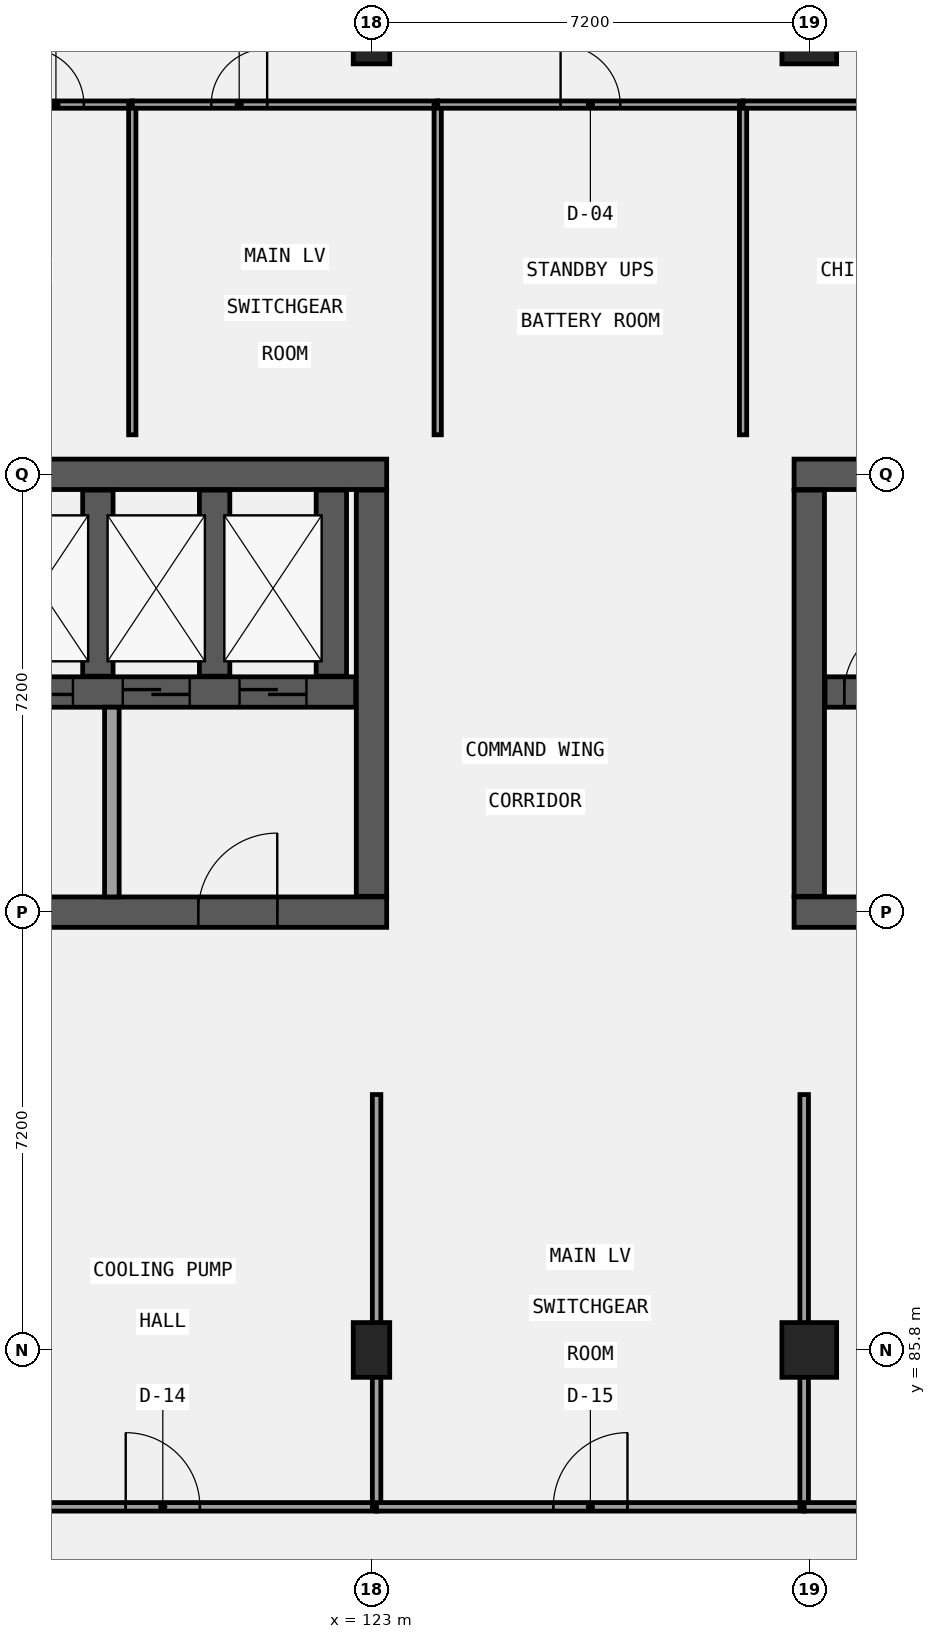
"""IFC4 building model, lengths in metres.
Left out: names, types, materials, properties, quantities, classifications, styles, units other than length and angle.
Written with IfcOpenShell. Run it as: python <this file> out.ifc"""

import sys

from ifc_helpers import new_model, si_unit, direction, frame, frame_2d, origin, origin_2d, place, context, subcontext, project, spatial, rectangle, extrude, element, fill, save


model = new_model("IFC4")
c1 = context("Model", 3, precision=1e-05, world=origin(), true_north=direction((0.0, 1.0)))
c2 = subcontext(c1, "Body", "Model", "MODEL_VIEW")
j1 = project(units=[si_unit("LENGTHUNIT", "METRE"), si_unit("PLANEANGLEUNIT", "RADIAN")], contexts=[c1])
p1 = place(None, origin())
s1 = spatial("IfcSite", under=j1, at=p1, CompositionType="ELEMENT")
p2 = place(p1, origin())
s2 = spatial("IfcBuilding", under=s1, at=p2, CompositionType="ELEMENT")
p3 = place(p2, frame((0.0, 0.0, -8.4)))
s3 = spatial("IfcBuildingStorey", under=s2, at=p3, CompositionType="ELEMENT", Elevation=-8.4)
p4 = place(p3, frame((108.35, 100.2, 0.0), z_axis=(0.0, 0.0, 1.0), x_axis=(1.0, 0.0, 0.0)))
e1 = element("IfcWall", 1, at=p4, inside=s3, PredefinedType="SHEAR", context=c2, shape_type="SweptSolid", body=[
    extrude(rectangle(XDim=14.9, YDim=0.5, at=frame_2d((7.45, 0.0))), origin(), (0.0, 0.0, 1.0), 4.2),
])
p5 = place(p3, frame((108.35, 93.0, 0.0), z_axis=(0.0, 0.0, 1.0), x_axis=(1.0, 0.0, 0.0)))
e2 = element("IfcWall", 2, at=p5, inside=s3, PredefinedType="SHEAR", context=c2, shape_type="SweptSolid", body=[
    extrude(rectangle(XDim=14.9, YDim=0.5, at=frame_2d((7.45, 0.0))), origin(), (0.0, 0.0, 1.0), 4.2),
])
p6 = place(p5, frame((3.8, 0.0, 0.0)))
e3 = element("IfcOpeningElement", 3, at=p6, cuts=e2, PredefinedType="OPENING", context=c2, shape_type="SweptSolid", body=[
    extrude(rectangle(XDim=1.3, YDim=2.2, at=frame_2d((0.65, 1.1))), frame((0.0, 0.26, 0.0), z_axis=(0.0, -1.0, 0.0), x_axis=(1.0, 0.0, 0.0)), (0.0, 0.0, 1.0), 0.52),
])
p7 = place(p5, frame((11.8, 0.0, 0.0)))
e4 = element("IfcOpeningElement", 4, at=p7, cuts=e2, PredefinedType="OPENING", context=c2, shape_type="SweptSolid", body=[
    extrude(rectangle(XDim=1.3, YDim=2.2, at=frame_2d((0.65, 1.1))), frame((0.0, 0.26, 0.0), z_axis=(0.0, -1.0, 0.0), x_axis=(1.0, 0.0, 0.0)), (0.0, 0.0, 1.0), 0.52),
])
p8 = place(p3, frame((123.0, 93.26, 0.0), z_axis=(0.0, 0.0, 1.0), x_axis=(0.0, 1.0, 0.0)))
e5 = element("IfcWall", 5, at=p8, inside=s3, PredefinedType="SHEAR", context=c2, shape_type="SweptSolid", body=[
    extrude(rectangle(XDim=6.68, YDim=0.5, at=frame_2d((3.34, 0.0))), origin(), (0.0, 0.0, 1.0), 4.2),
])
p9 = place(p3, frame((108.86, 96.62, 0.0), z_axis=(0.0, 0.0, 1.0), x_axis=(1.0, 0.0, 0.0)))
e6 = element("IfcWall", 6, at=p9, inside=s3, PredefinedType="SHEAR", context=c2, shape_type="SweptSolid", body=[
    extrude(rectangle(XDim=13.88, YDim=0.5, at=frame_2d((6.94, 0.0))), origin(), (0.0, 0.0, 1.0), 4.2),
])
p10 = place(p9, frame((8.13, 0.0, 0.0)))
e7 = element("IfcOpeningElement", 7, at=p10, cuts=e6, PredefinedType="OPENING", context=c2, shape_type="SweptSolid", body=[
    extrude(rectangle(XDim=1.1, YDim=2.15, at=frame_2d((0.55, 1.075))), frame((0.0, 0.26, 0.0), z_axis=(0.0, -1.0, 0.0), x_axis=(1.0, 0.0, 0.0)), (0.0, 0.0, 1.0), 0.52),
])
p11 = place(p9, frame((10.05, 0.0, 0.0)))
e8 = element("IfcOpeningElement", 8, at=p11, cuts=e6, PredefinedType="OPENING", context=c2, shape_type="SweptSolid", body=[
    extrude(rectangle(XDim=1.1, YDim=2.15, at=frame_2d((0.55, 1.075))), frame((0.0, 0.26, 0.0), z_axis=(0.0, -1.0, 0.0), x_axis=(1.0, 0.0, 0.0)), (0.0, 0.0, 1.0), 0.52),
])
p12 = place(p9, frame((11.97, 0.0, 0.0)))
e9 = element("IfcOpeningElement", 9, at=p12, cuts=e6, PredefinedType="OPENING", context=c2, shape_type="SweptSolid", body=[
    extrude(rectangle(XDim=1.1, YDim=2.15, at=frame_2d((0.55, 1.075))), frame((0.0, 0.26, 0.0), z_axis=(0.0, -1.0, 0.0), x_axis=(1.0, 0.0, 0.0)), (0.0, 0.0, 1.0), 0.52),
])
p13 = place(p9, frame((0.315, 0.0, 0.0)))
e10 = element("IfcOpeningElement", 10, at=p13, cuts=e6, PredefinedType="OPENING", context=c2, shape_type="SweptSolid", body=[
    extrude(rectangle(XDim=1.15, YDim=2.15, at=frame_2d((0.575, 1.075))), frame((0.0, 0.26, 0.0), z_axis=(0.0, -1.0, 0.0), x_axis=(1.0, 0.0, 0.0)), (0.0, 0.0, 1.0), 0.52),
])
for number, where, z_axis, x_axis in (
    (11, (118.5, 96.88, 0.0), (0.0, 0.0, 1.0), (0.0, 1.0, 0.0)),
    (12, (120.42, 96.88, 0.0), (0.0, 0.0, 1.0), (0.0, 1.0, 0.0)),
    (13, (122.34, 96.88, 0.0), (0.0, 0.0, 1.0), (0.0, 1.0, 0.0)),
):
    element("IfcWall", number, at=place(p3, frame(where, z_axis=z_axis, x_axis=x_axis)), inside=s3, PredefinedType="SHEAR", context=c2, shape_type="SweptSolid", body=[
        extrude(rectangle(XDim=3.06, YDim=0.5, at=frame_2d((1.53, 0.0))), origin(), (0.0, 0.0, 1.0), 4.2),
    ])
p14 = place(p3, frame((129.95, 100.2, 0.0), z_axis=(0.0, 0.0, 1.0), x_axis=(1.0, 0.0, 0.0)))
e14 = element("IfcWall", 14, at=p14, inside=s3, PredefinedType="SHEAR", context=c2, shape_type="SweptSolid", body=[
    extrude(rectangle(XDim=14.9, YDim=0.5, at=frame_2d((7.45, 0.0))), origin(), (0.0, 0.0, 1.0), 4.2),
])
p15 = place(p3, frame((129.95, 93.0, 0.0), z_axis=(0.0, 0.0, 1.0), x_axis=(1.0, 0.0, 0.0)))
e15 = element("IfcWall", 15, at=p15, inside=s3, PredefinedType="SHEAR", context=c2, shape_type="SweptSolid", body=[
    extrude(rectangle(XDim=14.9, YDim=0.5, at=frame_2d((7.45, 0.0))), origin(), (0.0, 0.0, 1.0), 4.2),
])
p16 = place(p15, frame((3.8, 0.0, 0.0)))
e16 = element("IfcOpeningElement", 16, at=p16, cuts=e15, PredefinedType="OPENING", context=c2, shape_type="SweptSolid", body=[
    extrude(rectangle(XDim=1.3, YDim=2.2, at=frame_2d((0.65, 1.1))), frame((0.0, 0.26, 0.0), z_axis=(0.0, -1.0, 0.0), x_axis=(1.0, 0.0, 0.0)), (0.0, 0.0, 1.0), 0.52),
])
p17 = place(p15, frame((11.8, 0.0, 0.0)))
e17 = element("IfcOpeningElement", 17, at=p17, cuts=e15, PredefinedType="OPENING", context=c2, shape_type="SweptSolid", body=[
    extrude(rectangle(XDim=1.3, YDim=2.2, at=frame_2d((0.65, 1.1))), frame((0.0, 0.26, 0.0), z_axis=(0.0, -1.0, 0.0), x_axis=(1.0, 0.0, 0.0)), (0.0, 0.0, 1.0), 0.52),
])
p18 = place(p3, frame((130.2, 93.26, 0.0), z_axis=(0.0, 0.0, 1.0), x_axis=(0.0, 1.0, 0.0)))
e18 = element("IfcWall", 18, at=p18, inside=s3, PredefinedType="SHEAR", context=c2, shape_type="SweptSolid", body=[
    extrude(rectangle(XDim=6.68, YDim=0.5, at=frame_2d((3.34, 0.0))), origin(), (0.0, 0.0, 1.0), 4.2),
])
p19 = place(p3, frame((130.46, 96.62, 0.0), z_axis=(0.0, 0.0, 1.0), x_axis=(1.0, 0.0, 0.0)))
e19 = element("IfcWall", 19, at=p19, inside=s3, PredefinedType="SHEAR", context=c2, shape_type="SweptSolid", body=[
    extrude(rectangle(XDim=13.88, YDim=0.5, at=frame_2d((6.94, 0.0))), origin(), (0.0, 0.0, 1.0), 4.2),
])
p20 = place(p19, frame((8.13, 0.0, 0.0)))
e20 = element("IfcOpeningElement", 20, at=p20, cuts=e19, PredefinedType="OPENING", context=c2, shape_type="SweptSolid", body=[
    extrude(rectangle(XDim=1.1, YDim=2.15, at=frame_2d((0.55, 1.075))), frame((0.0, 0.26, 0.0), z_axis=(0.0, -1.0, 0.0), x_axis=(1.0, 0.0, 0.0)), (0.0, 0.0, 1.0), 0.52),
])
p21 = place(p19, frame((10.05, 0.0, 0.0)))
e21 = element("IfcOpeningElement", 21, at=p21, cuts=e19, PredefinedType="OPENING", context=c2, shape_type="SweptSolid", body=[
    extrude(rectangle(XDim=1.1, YDim=2.15, at=frame_2d((0.55, 1.075))), frame((0.0, 0.26, 0.0), z_axis=(0.0, -1.0, 0.0), x_axis=(1.0, 0.0, 0.0)), (0.0, 0.0, 1.0), 0.52),
])
p22 = place(p19, frame((11.97, 0.0, 0.0)))
e22 = element("IfcOpeningElement", 22, at=p22, cuts=e19, PredefinedType="OPENING", context=c2, shape_type="SweptSolid", body=[
    extrude(rectangle(XDim=1.1, YDim=2.15, at=frame_2d((0.55, 1.075))), frame((0.0, 0.26, 0.0), z_axis=(0.0, -1.0, 0.0), x_axis=(1.0, 0.0, 0.0)), (0.0, 0.0, 1.0), 0.52),
])
p23 = place(p19, frame((0.315, 0.0, 0.0)))
e23 = element("IfcOpeningElement", 23, at=p23, cuts=e19, PredefinedType="OPENING", context=c2, shape_type="SweptSolid", body=[
    extrude(rectangle(XDim=1.15, YDim=2.15, at=frame_2d((0.575, 1.075))), frame((0.0, 0.26, 0.0), z_axis=(0.0, -1.0, 0.0), x_axis=(1.0, 0.0, 0.0)), (0.0, 0.0, 1.0), 0.52),
])
for number, where, z_axis, x_axis in (
    (24, (123.0, 85.8, 0.0), (0.0, 0.0, 1.0), (1.0, 0.0, 0.0)),
    (25, (123.0, 107.4, 0.0), (0.0, 0.0, 1.0), (1.0, 0.0, 0.0)),
):
    element("IfcColumn", number, at=place(p3, frame(where, z_axis=z_axis, x_axis=x_axis)), inside=s3, PredefinedType="COLUMN", context=c2, shape_type="SweptSolid", body=[
        extrude(rectangle(XDim=0.6, YDim=0.9, at=origin_2d()), origin(), (0.0, 0.0, 1.0), 4.2),
    ])
for number, where, z_axis, x_axis in (
    (26, (130.2, 85.8, 0.0), (0.0, 0.0, 1.0), (1.0, 0.0, 0.0)),
    (27, (130.2, 107.4, 0.0), (0.0, 0.0, 1.0), (1.0, 0.0, 0.0)),
):
    element("IfcColumn", number, at=place(p3, frame(where, z_axis=z_axis, x_axis=x_axis)), inside=s3, PredefinedType="COLUMN", context=c2, shape_type="SweptSolid", body=[
        extrude(rectangle(XDim=0.9, YDim=0.9, at=origin_2d()), origin(), (0.0, 0.0, 1.0), 4.2),
    ])
p24 = place(p3, frame((118.73, 93.25, 0.0), z_axis=(0.0, 0.0, 1.0), x_axis=(0.0, 1.0, 0.0)))
e28 = element("IfcWall", 28, at=p24, inside=s3, PredefinedType="SOLIDWALL", context=c2, shape_type="SweptSolid", body=[
    extrude(rectangle(XDim=3.12, YDim=0.24, at=frame_2d((1.56, 0.0))), origin(), (0.0, 0.0, 1.0), 3.87),
])
p25 = place(p3, frame((114.043, 106.28, 0.0), z_axis=(0.0, 0.0, 1.0), x_axis=(1.0, 0.0, 0.0)))
e29 = element("IfcWall", 29, at=p25, inside=s3, PredefinedType="PARTITIONING", context=c2, shape_type="SweptSolid", body=[
    extrude(rectangle(XDim=5.023, YDim=0.12, at=frame_2d((2.511, 0.0))), origin(), (0.0, 0.0, 1.0), 3.9),
])
p26 = place(p25, frame((3.307, 0.0, 0.0)))
e30 = element("IfcOpeningElement", 30, at=p26, cuts=e29, PredefinedType="OPENING", context=c2, shape_type="SweptSolid", body=[
    extrude(rectangle(XDim=0.92, YDim=2.22, at=frame_2d((0.46, 1.11))), frame((0.0, 0.07, 0.0), z_axis=(0.0, -1.0, 0.0), x_axis=(1.0, 0.0, 0.0)), (0.0, 0.0, 1.0), 0.14),
])
p27 = place(p3, frame((119.066, 100.85, 0.0), z_axis=(0.0, 0.0, 1.0), x_axis=(0.0, 1.0, 0.0)))
e31 = element("IfcWall", 31, at=p27, inside=s3, PredefinedType="PARTITIONING", context=c2, shape_type="SweptSolid", body=[
    extrude(rectangle(XDim=5.43, YDim=0.12, at=frame_2d((2.715, 0.0))), origin(), (0.0, 0.0, 1.0), 3.9),
])
p28 = place(p3, frame((119.066, 106.28, 0.0), z_axis=(0.0, 0.0, 1.0), x_axis=(1.0, 0.0, 0.0)))
e32 = element("IfcWall", 32, at=p28, inside=s3, PredefinedType="PARTITIONING", context=c2, shape_type="SweptSolid", body=[
    extrude(rectangle(XDim=5.023, YDim=0.12, at=frame_2d((2.512, 0.0))), origin(), (0.0, 0.0, 1.0), 3.9),
])
p29 = place(p28, frame((1.298, 0.0, 0.0)))
e33 = element("IfcOpeningElement", 33, at=p29, cuts=e32, PredefinedType="OPENING", context=c2, shape_type="SweptSolid", body=[
    extrude(rectangle(XDim=0.92, YDim=2.35, at=frame_2d((0.46, 1.175))), frame((0.0, 0.07, 0.0), z_axis=(0.0, -1.0, 0.0), x_axis=(1.0, 0.0, 0.0)), (0.0, 0.0, 1.0), 0.14),
])
p30 = place(p3, frame((124.089, 100.85, 0.0), z_axis=(0.0, 0.0, 1.0), x_axis=(0.0, 1.0, 0.0)))
e34 = element("IfcWall", 34, at=p30, inside=s3, PredefinedType="PARTITIONING", context=c2, shape_type="SweptSolid", body=[
    extrude(rectangle(XDim=5.43, YDim=0.12, at=frame_2d((2.715, 0.0))), origin(), (0.0, 0.0, 1.0), 3.9),
])
p31 = place(p3, frame((124.089, 106.28, 0.0), z_axis=(0.0, 0.0, 1.0), x_axis=(1.0, 0.0, 0.0)))
e35 = element("IfcWall", 35, at=p31, inside=s3, PredefinedType="PARTITIONING", context=c2, shape_type="SweptSolid", body=[
    extrude(rectangle(XDim=5.022, YDim=0.12, at=frame_2d((2.511, 0.0))), origin(), (0.0, 0.0, 1.0), 3.9),
])
p32 = place(p31, frame((2.021, 0.0, 0.0)))
e36 = element("IfcOpeningElement", 36, at=p32, cuts=e35, PredefinedType="OPENING", context=c2, shape_type="SweptSolid", body=[
    extrude(rectangle(XDim=0.98, YDim=2.1, at=frame_2d((0.49, 1.05))), frame((0.0, 0.07, 0.0), z_axis=(0.0, -1.0, 0.0), x_axis=(1.0, 0.0, 0.0)), (0.0, 0.0, 1.0), 0.14),
])
p33 = place(p3, frame((129.111, 100.85, 0.0), z_axis=(0.0, 0.0, 1.0), x_axis=(0.0, 1.0, 0.0)))
e37 = element("IfcWall", 37, at=p33, inside=s3, PredefinedType="PARTITIONING", context=c2, shape_type="SweptSolid", body=[
    extrude(rectangle(XDim=5.43, YDim=0.12, at=frame_2d((2.715, 0.0))), origin(), (0.0, 0.0, 1.0), 3.9),
])
p34 = place(p3, frame((129.111, 106.28, 0.0), z_axis=(0.0, 0.0, 1.0), x_axis=(1.0, 0.0, 0.0)))
e38 = element("IfcWall", 38, at=p34, inside=s3, PredefinedType="PARTITIONING", context=c2, shape_type="SweptSolid", body=[
    extrude(rectangle(XDim=5.023, YDim=0.12, at=frame_2d((2.511, 0.0))), origin(), (0.0, 0.0, 1.0), 3.9),
])
p35 = place(p34, frame((2.775, 0.0, 0.0)))
e39 = element("IfcOpeningElement", 39, at=p35, cuts=e38, PredefinedType="OPENING", context=c2, shape_type="SweptSolid", body=[
    extrude(rectangle(XDim=0.98, YDim=2.22, at=frame_2d((0.49, 1.11))), frame((0.0, 0.07, 0.0), z_axis=(0.0, -1.0, 0.0), x_axis=(1.0, 0.0, 0.0)), (0.0, 0.0, 1.0), 0.14),
])
p36 = place(p3, frame((116.052, 83.22, 0.0), z_axis=(0.0, 0.0, 1.0), x_axis=(1.0, 0.0, 0.0)))
e40 = element("IfcWall", 40, at=p36, inside=s3, PredefinedType="PARTITIONING", context=c2, shape_type="SweptSolid", body=[
    extrude(rectangle(XDim=7.032, YDim=0.14, at=frame_2d((3.516, 0.0))), origin(), (0.0, 0.0, 1.0), 3.9),
])
p37 = place(p36, frame((2.906, 0.0, 0.0)))
e41 = element("IfcOpeningElement", 41, at=p37, cuts=e40, PredefinedType="OPENING", context=c2, shape_type="SweptSolid", body=[
    extrude(rectangle(XDim=1.22, YDim=2.22, at=frame_2d((0.61, 1.11))), frame((0.0, 0.08, 0.0), z_axis=(0.0, -1.0, 0.0), x_axis=(1.0, 0.0, 0.0)), (0.0, 0.0, 1.0), 0.16),
])
p38 = place(p3, frame((123.084, 83.22, 0.0), z_axis=(0.0, 0.0, 1.0), x_axis=(0.0, 1.0, 0.0)))
e42 = element("IfcWall", 42, at=p38, inside=s3, PredefinedType="PARTITIONING", context=c2, shape_type="SweptSolid", body=[
    extrude(rectangle(XDim=6.78, YDim=0.14, at=frame_2d((3.39, 0.0))), origin(), (0.0, 0.0, 1.0), 3.1),
])
p39 = place(p3, frame((123.084, 83.22, 0.0), z_axis=(0.0, 0.0, 1.0), x_axis=(1.0, 0.0, 0.0)))
e43 = element("IfcWall", 43, at=p39, inside=s3, PredefinedType="PARTITIONING", context=c2, shape_type="SweptSolid", body=[
    extrude(rectangle(XDim=7.032, YDim=0.14, at=frame_2d((3.516, 0.0))), origin(), (0.0, 0.0, 1.0), 3.9),
])
p40 = place(p39, frame((2.906, 0.0, 0.0)))
e44 = element("IfcOpeningElement", 44, at=p40, cuts=e43, PredefinedType="OPENING", context=c2, shape_type="SweptSolid", body=[
    extrude(rectangle(XDim=1.22, YDim=2.35, at=frame_2d((0.61, 1.175))), frame((0.0, 0.08, 0.0), z_axis=(0.0, -1.0, 0.0), x_axis=(1.0, 0.0, 0.0)), (0.0, 0.0, 1.0), 0.16),
])
p41 = place(p3, frame((130.116, 83.22, 0.0), z_axis=(0.0, 0.0, 1.0), x_axis=(0.0, 1.0, 0.0)))
e45 = element("IfcWall", 45, at=p41, inside=s3, PredefinedType="PARTITIONING", context=c2, shape_type="SweptSolid", body=[
    extrude(rectangle(XDim=6.78, YDim=0.14, at=frame_2d((3.39, 0.0))), origin(), (0.0, 0.0, 1.0), 3.05),
])
p42 = place(p3, frame((130.116, 83.22, 0.0), z_axis=(0.0, 0.0, 1.0), x_axis=(1.0, 0.0, 0.0)))
e46 = element("IfcWall", 46, at=p42, inside=s3, PredefinedType="PARTITIONING", context=c2, shape_type="SweptSolid", body=[
    extrude(rectangle(XDim=7.032, YDim=0.14, at=frame_2d((3.516, 0.0))), origin(), (0.0, 0.0, 1.0), 3.9),
])
p43 = place(p42, frame((2.836, 0.0, 0.0)))
e47 = element("IfcOpeningElement", 47, at=p43, cuts=e46, PredefinedType="OPENING", context=c2, shape_type="SweptSolid", body=[
    extrude(rectangle(XDim=1.36, YDim=2.1, at=frame_2d((0.68, 1.05))), frame((0.0, 0.08, 0.0), z_axis=(0.0, -1.0, 0.0), x_axis=(1.0, 0.0, 0.0)), (0.0, 0.0, 1.0), 0.16),
])
p44 = place(p10, frame((1.1, 0.0, 0.0), z_axis=(0.0, 0.0, 1.0), x_axis=(-1.0, 0.0, 0.0)))
e48 = element("IfcDoor", 48, at=p44, inside=s3, OperationType="DOUBLE_DOOR_SLIDING", PredefinedType="DOOR", context=c2, shape_type="SweptSolid", body=[
    extrude(rectangle(XDim=1.1, YDim=2.15, at=frame_2d((0.55, 1.075))), frame((0.0, 0.025, 0.0), z_axis=(0.0, -1.0, 0.0), x_axis=(1.0, 0.0, 0.0)), (0.0, 0.0, 1.0), 0.05),
])
fill(e7, e48)
p45 = place(p11, frame((1.1, 0.0, 0.0), z_axis=(0.0, 0.0, 1.0), x_axis=(-1.0, 0.0, 0.0)))
e49 = element("IfcDoor", 49, at=p45, inside=s3, OperationType="DOUBLE_DOOR_SLIDING", PredefinedType="DOOR", context=c2, shape_type="SweptSolid", body=[
    extrude(rectangle(XDim=1.1, YDim=2.15, at=frame_2d((0.55, 1.075))), frame((0.0, 0.025, 0.0), z_axis=(0.0, -1.0, 0.0), x_axis=(1.0, 0.0, 0.0)), (0.0, 0.0, 1.0), 0.05),
])
fill(e8, e49)
p46 = place(p12, frame((1.1, 0.0, 0.0), z_axis=(0.0, 0.0, 1.0), x_axis=(-1.0, 0.0, 0.0)))
e50 = element("IfcDoor", 50, at=p46, inside=s3, OperationType="DOUBLE_DOOR_SLIDING", PredefinedType="DOOR", context=c2, shape_type="SweptSolid", body=[
    extrude(rectangle(XDim=1.1, YDim=2.15, at=frame_2d((0.55, 1.075))), frame((0.0, 0.025, 0.0), z_axis=(0.0, -1.0, 0.0), x_axis=(1.0, 0.0, 0.0)), (0.0, 0.0, 1.0), 0.05),
])
fill(e9, e50)
p47 = place(p7, frame((1.3, 0.0, 0.0), z_axis=(0.0, 0.0, 1.0), x_axis=(-1.0, 0.0, 0.0)))
e51 = element("IfcDoor", 51, at=p47, inside=s3, OperationType="SINGLE_SWING_RIGHT", PredefinedType="DOOR", context=c2, shape_type="SweptSolid", body=[
    extrude(rectangle(XDim=1.3, YDim=2.2, at=frame_2d((0.65, 1.1))), frame((0.0, 0.025, 0.0), z_axis=(0.0, -1.0, 0.0), x_axis=(1.0, 0.0, 0.0)), (0.0, 0.0, 1.0), 0.05),
])
fill(e4, e51)
p48 = place(p23, origin())
e52 = element("IfcDoor", 52, at=p48, inside=s3, OperationType="SINGLE_SWING_RIGHT", PredefinedType="DOOR", context=c2, shape_type="SweptSolid", body=[
    extrude(rectangle(XDim=1.15, YDim=2.15, at=frame_2d((0.575, 1.075))), frame((0.0, 0.025, 0.0), z_axis=(0.0, -1.0, 0.0), x_axis=(1.0, 0.0, 0.0)), (0.0, 0.0, 1.0), 0.05),
])
fill(e23, e52)
p49 = place(p26, frame((0.92, 0.0, 0.0), z_axis=(0.0, 0.0, 1.0), x_axis=(-1.0, 0.0, 0.0)))
e53 = element("IfcDoor", 53, at=p49, inside=s3, OperationType="SINGLE_SWING_LEFT", PredefinedType="DOOR", context=c2, shape_type="SweptSolid", body=[
    extrude(rectangle(XDim=0.92, YDim=2.22, at=frame_2d((0.46, 1.11))), frame((0.0, 0.025, 0.0), z_axis=(0.0, -1.0, 0.0), x_axis=(1.0, 0.0, 0.0)), (0.0, 0.0, 1.0), 0.05),
])
fill(e30, e53)
p50 = place(p29, frame((0.92, 0.0, 0.0), z_axis=(0.0, 0.0, 1.0), x_axis=(-1.0, 0.0, 0.0)))
e54 = element("IfcDoor", 54, at=p50, inside=s3, OperationType="SINGLE_SWING_RIGHT", PredefinedType="DOOR", context=c2, shape_type="SweptSolid", body=[
    extrude(rectangle(XDim=0.92, YDim=2.35, at=frame_2d((0.46, 1.175))), frame((0.0, 0.025, 0.0), z_axis=(0.0, -1.0, 0.0), x_axis=(1.0, 0.0, 0.0)), (0.0, 0.0, 1.0), 0.05),
])
fill(e33, e54)
p51 = place(p32, frame((0.98, 0.0, 0.0), z_axis=(0.0, 0.0, 1.0), x_axis=(-1.0, 0.0, 0.0)))
e55 = element("IfcDoor", 55, at=p51, inside=s3, OperationType="SINGLE_SWING_LEFT", PredefinedType="DOOR", context=c2, shape_type="SweptSolid", body=[
    extrude(rectangle(XDim=0.98, YDim=2.1, at=frame_2d((0.49, 1.05))), frame((0.0, 0.025, 0.0), z_axis=(0.0, -1.0, 0.0), x_axis=(1.0, 0.0, 0.0)), (0.0, 0.0, 1.0), 0.05),
])
fill(e36, e55)
p52 = place(p37, origin())
e56 = element("IfcDoor", 56, at=p52, inside=s3, OperationType="SINGLE_SWING_LEFT", PredefinedType="DOOR", context=c2, shape_type="SweptSolid", body=[
    extrude(rectangle(XDim=1.22, YDim=2.22, at=frame_2d((0.61, 1.11))), frame((0.0, 0.025, 0.0), z_axis=(0.0, -1.0, 0.0), x_axis=(1.0, 0.0, 0.0)), (0.0, 0.0, 1.0), 0.05),
])
fill(e41, e56)
p53 = place(p40, origin())
e57 = element("IfcDoor", 57, at=p53, inside=s3, OperationType="SINGLE_SWING_RIGHT", PredefinedType="DOOR", context=c2, shape_type="SweptSolid", body=[
    extrude(rectangle(XDim=1.22, YDim=2.35, at=frame_2d((0.61, 1.175))), frame((0.0, 0.025, 0.0), z_axis=(0.0, -1.0, 0.0), x_axis=(1.0, 0.0, 0.0)), (0.0, 0.0, 1.0), 0.05),
])
fill(e44, e57)
save(model, sys.argv[1])
